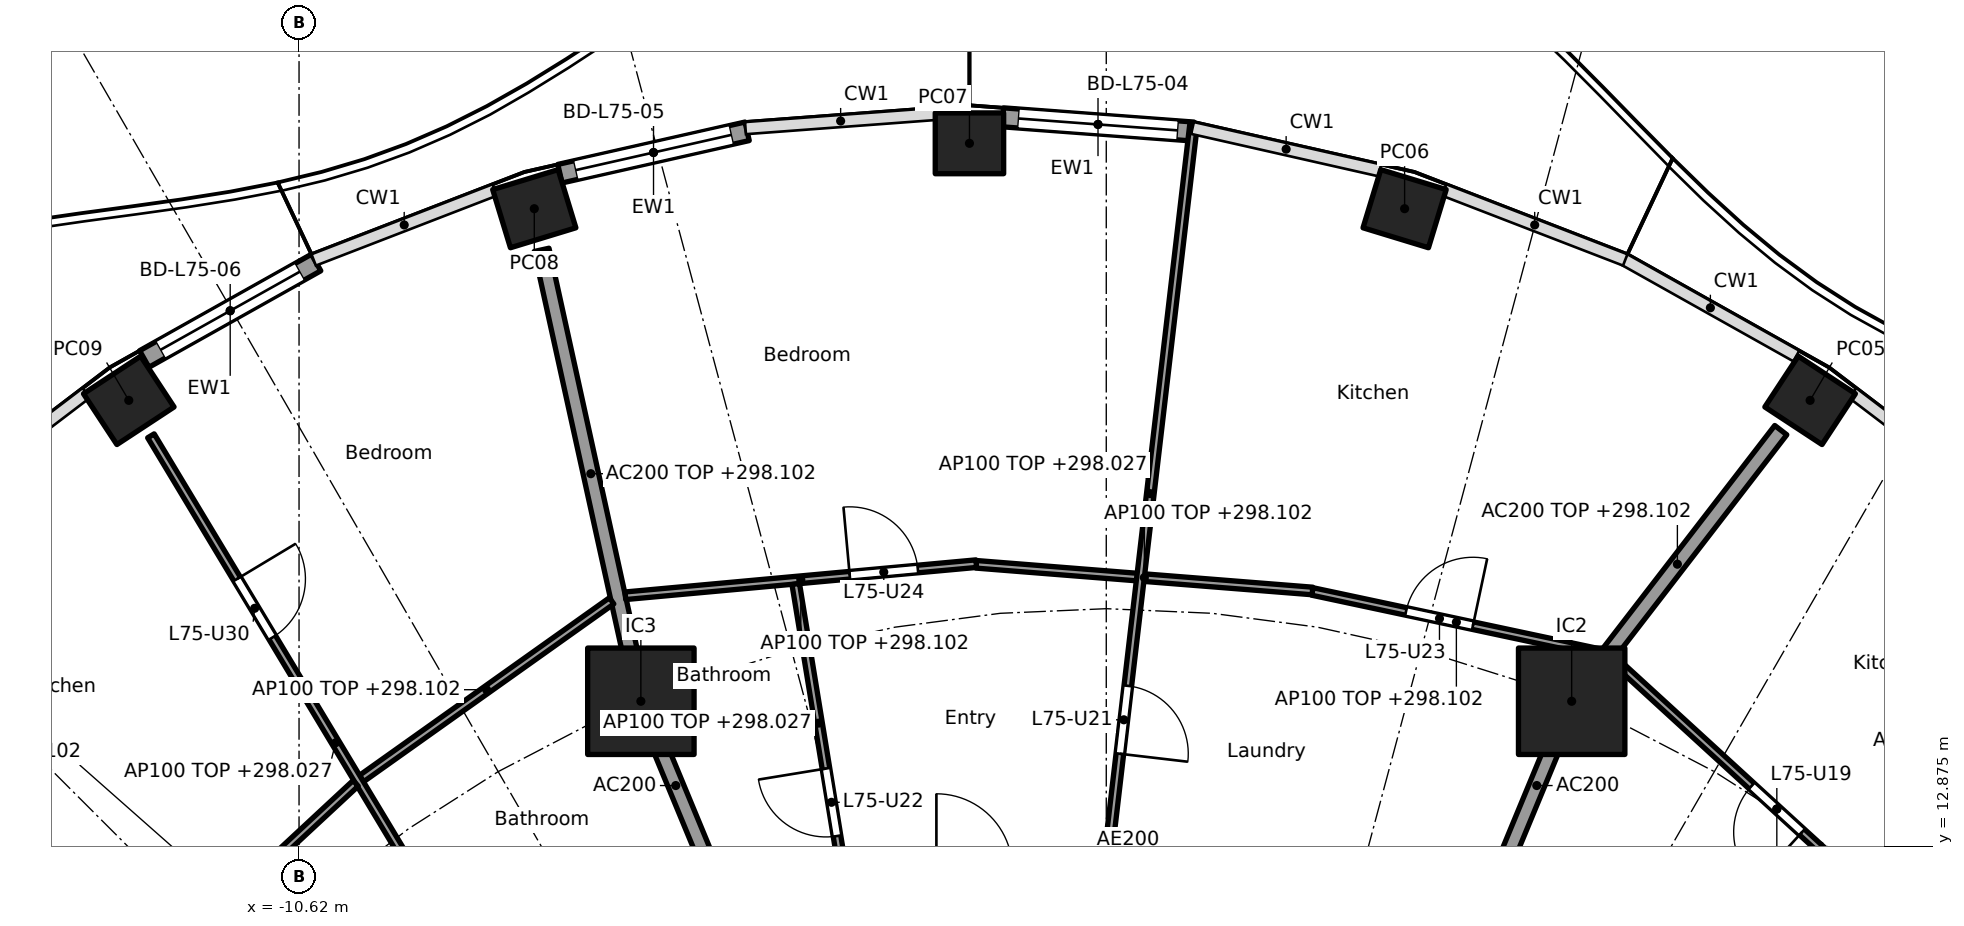
"""IFC4 building model, lengths in metres.
Left out: names, types, materials, properties, quantities, classifications, styles, units other than length and angle.
Written with IfcOpenShell. Run it as: python <this file> out.ifc"""

import sys

from ifc_helpers import new_model, si_unit, direction, frame, frame_2d, origin, origin_2d, place, context, subcontext, project, spatial, rectangle, hollow_rectangle, extrude, element, fill, save


model = new_model("IFC4")
c1 = context("Model", 3, precision=1e-05, world=origin(), true_north=direction((0.0, 1.0)))
c2 = subcontext(c1, "Body", "Model", "MODEL_VIEW")
j1 = project(units=[si_unit("LENGTHUNIT", "METRE"), si_unit("PLANEANGLEUNIT", "RADIAN")], contexts=[c1])
p1 = place(None, origin())
s1 = spatial("IfcSite", under=j1, at=p1, CompositionType="ELEMENT")
p2 = place(p1, origin())
s2 = spatial("IfcBuilding", under=s1, at=p2, CompositionType="ELEMENT")
p3 = place(p2, frame((0.0, 0.0, 295.5)))
s3 = spatial("IfcBuildingStorey", under=s2, at=p3, CompositionType="ELEMENT", Elevation=295.5)
for number, where, z_axis, x_axis in (
    (1, (9.26, 18.741, 0.0), (0.0, 0.0, 1.0), (-0.836, 0.549, 0.0)),
    (2, (3.925, 21.262, 0.0), (0.0, 0.0, 1.0), (-0.957, 0.292, 0.0)),
    (3, (-1.8, 22.122, 0.0), (0.0, 0.0, 1.0), (-1.0, 0.0, 0.0)),
    (4, (-7.525, 21.262, 0.0), (0.0, 0.0, 1.0), (-0.957, -0.292, 0.0)),
    (5, (-12.86, 18.741, 0.0), (0.0, 0.0, 1.0), (-0.836, -0.549, 0.0)),
):
    element("IfcColumn", number, at=place(p3, frame(where, z_axis=z_axis, x_axis=x_axis)), inside=s3, PredefinedType="COLUMN", context=c2, shape_type="SweptSolid", body=[
        extrude(hollow_rectangle(XDim=0.9, YDim=0.8, WallThickness=0.028, at=origin_2d()), origin(), (0.0, 0.0, 1.0), 3.7),
    ])
for number, where, z_axis, x_axis in (
    (6, (6.123, 14.782, 0.0), (0.0, 0.0, 1.0), (1.0, 0.0, 0.0)),
    (7, (-6.123, 14.782, 0.0), (0.0, 0.0, 1.0), (1.0, 0.0, 0.0)),
):
    element("IfcColumn", number, at=place(p3, frame(where, z_axis=z_axis, x_axis=x_axis)), inside=s3, PredefinedType="COLUMN", context=c2, shape_type="SweptSolid", body=[
        extrude(rectangle(XDim=1.4, YDim=1.4, at=origin_2d()), origin(), (0.0, 0.0, 1.0), 3.7),
    ])
p4 = place(p3, frame((-1.361, 22.464, 0.0), z_axis=(0.0, 0.0, 1.0), x_axis=(0.997229684519, -0.074383844448, 0.0)))
e8 = element("IfcWall", 8, at=p4, inside=s3, PredefinedType="SOLIDWALL", context=c2, shape_type="SweptSolid", body=[
    extrude(rectangle(XDim=2.511, YDim=0.25, at=frame_2d((1.255, 0.0))), origin(), (0.0, 0.0, 1.0), 3.28),
])
p5 = place(p4, frame((0.205, 0.0, 0.0)))
e9 = element("IfcOpeningElement", 9, at=p5, cuts=e8, PredefinedType="OPENING", context=c2, shape_type="SweptSolid", body=[
    extrude(rectangle(XDim=2.1, YDim=2.4, at=frame_2d((1.05, 1.2))), frame((0.0, 0.135, 0.0), z_axis=(0.0, -1.0, 0.0), x_axis=(1.0, 0.0, 0.0)), (0.0, 0.0, 1.0), 0.27),
])
p6 = place(p3, frame((-7.188, 21.723, 0.0), z_axis=(0.0, 0.0, 1.0), x_axis=(0.975319584032, 0.220797891756, 0.0)))
e10 = element("IfcWall", 10, at=p6, inside=s3, PredefinedType="SOLIDWALL", context=c2, shape_type="SweptSolid", body=[
    extrude(rectangle(XDim=2.525, YDim=0.25, at=frame_2d((1.263, 0.0))), origin(), (0.0, 0.0, 1.0), 3.28),
])
p7 = place(p6, frame((0.213, 0.0, 0.0)))
e11 = element("IfcOpeningElement", 11, at=p7, cuts=e10, PredefinedType="OPENING", context=c2, shape_type="SweptSolid", body=[
    extrude(rectangle(XDim=2.1, YDim=2.4, at=frame_2d((1.05, 1.2))), frame((0.0, 0.135, 0.0), z_axis=(0.0, -1.0, 0.0), x_axis=(1.0, 0.0, 0.0)), (0.0, 0.0, 1.0), 0.27),
])
p8 = place(p3, frame((-12.656, 19.285, 0.0), z_axis=(0.0, 0.0, 1.0), x_axis=(0.872075426507, 0.489371485154, 0.0)))
e12 = element("IfcWall", 12, at=p8, inside=s3, PredefinedType="SOLIDWALL", context=c2, shape_type="SweptSolid", body=[
    extrude(rectangle(XDim=2.593, YDim=0.25, at=frame_2d((1.297, 0.0))), origin(), (0.0, 0.0, 1.0), 3.28),
])
p9 = place(p8, frame((0.247, 0.0, 0.0)))
e13 = element("IfcOpeningElement", 13, at=p9, cuts=e12, PredefinedType="OPENING", context=c2, shape_type="SweptSolid", body=[
    extrude(rectangle(XDim=2.1, YDim=2.4, at=frame_2d((1.05, 1.2))), frame((0.0, 0.135, 0.0), z_axis=(0.0, -1.0, 0.0), x_axis=(1.0, 0.0, 0.0)), (0.0, 0.0, 1.0), 0.27),
])
p10 = place(p3, frame((5.243, 12.657, 0.0), z_axis=(0.0, 0.0, 1.0), x_axis=(0.382691608661, 0.923876145736, 0.0)))
e14 = element("IfcWall", 14, at=p10, inside=s3, PredefinedType="PARTITIONING", context=c2, shape_type="SweptSolid", body=[
    extrude(rectangle(XDim=2.2, YDim=0.2, at=frame_2d((1.1, 0.0))), origin(), (0.0, 0.0, 1.0), 3.28),
])
p11 = place(p3, frame((6.154, 14.822, 0.0), z_axis=(0.0, 0.0, 1.0), x_axis=(0.610687612043, 0.791871606068, 0.0)))
e15 = element("IfcWall", 15, at=p11, inside=s3, PredefinedType="PARTITIONING", context=c2, shape_type="SweptSolid", body=[
    extrude(rectangle(XDim=4.455, YDim=0.2, at=frame_2d((2.228, 0.0))), origin(), (0.0, 0.0, 1.0), 2.602),
])
p12 = place(p3, frame((-5.243, 12.657, 0.0), z_axis=(0.0, 0.0, 1.0), x_axis=(-0.38273085373, 0.923859888513, 0.0)))
e16 = element("IfcWall", 16, at=p12, inside=s3, PredefinedType="PARTITIONING", context=c2, shape_type="SweptSolid", body=[
    extrude(rectangle(XDim=2.199, YDim=0.2, at=frame_2d((1.1, 0.0))), origin(), (0.0, 0.0, 1.0), 3.28),
])
p13 = place(p3, frame((-6.134, 14.831, 0.0), z_axis=(0.0, 0.0, 1.0), x_axis=(-0.214842475666, 0.976648714047, 0.0)))
e17 = element("IfcWall", 17, at=p13, inside=s3, PredefinedType="PARTITIONING", context=c2, shape_type="SweptSolid", body=[
    extrude(rectangle(XDim=6.031, YDim=0.2, at=frame_2d((3.015, 0.0))), origin(), (0.0, 0.0, 1.0), 2.602),
])
p14 = place(p3, frame((10.972, 11.398, 0.0), z_axis=(0.0, 0.0, 1.0), x_axis=(-0.737830272434, 0.674986288069, 0.0)))
e18 = element("IfcWall", 18, at=p14, inside=s3, PredefinedType="PARTITIONING", context=c2, shape_type="SweptSolid", body=[
    extrude(rectangle(XDim=5.827, YDim=0.1, at=frame_2d((2.914, 0.0))), origin(), (0.0, 0.0, 1.0), 2.602),
])
p15 = place(p14, frame((2.464, 0.0, 0.0)))
e19 = element("IfcOpeningElement", 19, at=p15, cuts=e18, PredefinedType="OPENING", context=c2, shape_type="SweptSolid", body=[
    extrude(rectangle(XDim=0.9, YDim=2.1, at=frame_2d((0.45, 1.05))), frame((0.0, 0.06, 0.0), z_axis=(0.0, -1.0, 0.0), x_axis=(1.0, 0.0, 0.0)), (0.0, 0.0, 1.0), 0.12),
])
p16 = place(p3, frame((6.5, 15.419, 0.0), z_axis=(0.0, 0.0, 1.0), x_axis=(-0.978053492557, 0.208353943321, 0.0)))
e20 = element("IfcWall", 20, at=p16, inside=s3, PredefinedType="PARTITIONING", context=c2, shape_type="SweptSolid", body=[
    extrude(rectangle(XDim=3.874, YDim=0.1, at=frame_2d((1.937, 0.0))), origin(), (0.0, 0.0, 1.0), 2.602),
])
p17 = place(p16, frame((1.714, 0.0, 0.0)))
e21 = element("IfcOpeningElement", 21, at=p17, cuts=e20, PredefinedType="OPENING", context=c2, shape_type="SweptSolid", body=[
    extrude(rectangle(XDim=0.9, YDim=2.1, at=frame_2d((0.45, 1.05))), frame((0.0, 0.06, 0.0), z_axis=(0.0, -1.0, 0.0), x_axis=(1.0, 0.0, 0.0)), (0.0, 0.0, 1.0), 0.12),
])
p18 = place(p3, frame((2.713, 16.233, 0.0), z_axis=(0.0, 0.0, 1.0), x_axis=(-0.996870142942, 0.079056423588, 0.0)))
e22 = element("IfcWall", 22, at=p18, inside=s3, PredefinedType="PARTITIONING", context=c2, shape_type="SweptSolid", body=[
    extrude(rectangle(XDim=4.438, YDim=0.1, at=frame_2d((2.219, 0.0))), origin(), (0.0, 0.0, 1.0), 2.602),
])
p19 = place(p3, frame((0.012, 12.664, 0.0), z_axis=(0.0, 0.0, 1.0), x_axis=(0.11636251357, 0.993206808996, 0.0)))
e23 = element("IfcWall", 23, at=p19, inside=s3, PredefinedType="PARTITIONING", context=c2, shape_type="SweptSolid", body=[
    extrude(rectangle(XDim=9.765, YDim=0.1, at=frame_2d((4.882, 0.0))), origin(), (0.0, 0.0, 1.0), 2.527),
])
p20 = place(p19, frame((1.437, 0.0, 0.0)))
e24 = element("IfcOpeningElement", 24, at=p20, cuts=e23, PredefinedType="OPENING", context=c2, shape_type="SweptSolid", body=[
    extrude(rectangle(XDim=0.9, YDim=2.1, at=frame_2d((0.45, 1.05))), frame((0.0, 0.06, 0.0), z_axis=(0.0, -1.0, 0.0), x_axis=(1.0, 0.0, 0.0)), (0.0, 0.0, 1.0), 0.12),
])
p21 = place(p3, frame((-1.711, 16.592, 0.0), z_axis=(0.0, 0.0, 1.0), x_axis=(-0.995843837247, -0.091077175065, 0.0)))
e25 = element("IfcWall", 25, at=p21, inside=s3, PredefinedType="PARTITIONING", context=c2, shape_type="SweptSolid", body=[
    extrude(rectangle(XDim=4.635, YDim=0.1, at=frame_2d((2.317, 0.0))), origin(), (0.0, 0.0, 1.0), 2.602),
])
p22 = place(p21, frame((0.771, 0.0, 0.0)))
e26 = element("IfcOpeningElement", 26, at=p22, cuts=e25, PredefinedType="OPENING", context=c2, shape_type="SweptSolid", body=[
    extrude(rectangle(XDim=0.9, YDim=2.1, at=frame_2d((0.45, 1.05))), frame((0.0, 0.06, 0.0), z_axis=(0.0, -1.0, 0.0), x_axis=(1.0, 0.0, 0.0)), (0.0, 0.0, 1.0), 0.12),
])
p23 = place(p3, frame((-3.486, 12.663, 0.0), z_axis=(0.0, 0.0, 1.0), x_axis=(-0.161602751674, 0.986855891532, 0.0)))
e27 = element("IfcWall", 27, at=p23, inside=s3, PredefinedType="PARTITIONING", context=c2, shape_type="SweptSolid", body=[
    extrude(rectangle(XDim=3.71, YDim=0.1, at=frame_2d((1.855, 0.0))), origin(), (0.0, 0.0, 1.0), 2.527),
])
p24 = place(p23, frame((0.35, 0.0, 0.0)))
e28 = element("IfcOpeningElement", 28, at=p24, cuts=e27, PredefinedType="OPENING", context=c2, shape_type="SweptSolid", body=[
    extrude(rectangle(XDim=0.9, YDim=2.1, at=frame_2d((0.45, 1.05))), frame((0.0, 0.06, 0.0), z_axis=(0.0, -1.0, 0.0), x_axis=(1.0, 0.0, 0.0)), (0.0, 0.0, 1.0), 0.12),
])
p25 = place(p3, frame((-6.508, 16.103, 0.0), z_axis=(0.0, 0.0, 1.0), x_axis=(-0.815202203556, -0.579176456114, 0.0)))
e29 = element("IfcWall", 29, at=p25, inside=s3, PredefinedType="PARTITIONING", context=c2, shape_type="SweptSolid", body=[
    extrude(rectangle(XDim=4.036, YDim=0.1, at=frame_2d((2.018, 0.0))), origin(), (0.0, 0.0, 1.0), 2.602),
])
p26 = place(p3, frame((-7.709, 10.197, 0.0), z_axis=(0.0, 0.0, 1.0), x_axis=(-0.515516160663, 0.856879856278, 0.0)))
e30 = element("IfcWall", 30, at=p26, inside=s3, PredefinedType="PARTITIONING", context=c2, shape_type="SweptSolid", body=[
    extrude(rectangle(XDim=9.426, YDim=0.1, at=frame_2d((4.713, 0.0))), origin(), (0.0, 0.0, 1.0), 2.527),
])
p27 = place(p26, frame((1.615, 0.0, 0.0)))
e31 = element("IfcOpeningElement", 31, at=p27, cuts=e30, PredefinedType="OPENING", context=c2, shape_type="SweptSolid", body=[
    extrude(rectangle(XDim=0.9, YDim=2.1, at=frame_2d((0.45, 1.05))), frame((0.0, 0.06, 0.0), z_axis=(0.0, -1.0, 0.0), x_axis=(1.0, 0.0, 0.0)), (0.0, 0.0, 1.0), 0.12),
])
p28 = place(p26, frame((6.328, 0.0, 0.0)))
e32 = element("IfcOpeningElement", 32, at=p28, cuts=e30, PredefinedType="OPENING", context=c2, shape_type="SweptSolid", body=[
    extrude(rectangle(XDim=0.9, YDim=2.1, at=frame_2d((0.45, 1.05))), frame((0.0, 0.06, 0.0), z_axis=(0.0, -1.0, 0.0), x_axis=(1.0, 0.0, 0.0)), (0.0, 0.0, 1.0), 0.12),
])
p29 = place(p3, frame((-9.875, 13.702, 0.0), z_axis=(0.0, 0.0, 1.0), x_axis=(-0.732618266441, -0.680639754699, 0.0)))
e33 = element("IfcWall", 33, at=p29, inside=s3, PredefinedType="PARTITIONING", context=c2, shape_type="SweptSolid", body=[
    extrude(rectangle(XDim=4.467, YDim=0.1, at=frame_2d((2.233, 0.0))), origin(), (0.0, 0.0, 1.0), 2.602),
])
p30 = place(p29, frame((1.783, 0.0, 0.0)))
e34 = element("IfcOpeningElement", 34, at=p30, cuts=e33, PredefinedType="OPENING", context=c2, shape_type="SweptSolid", body=[
    extrude(rectangle(XDim=0.9, YDim=2.1, at=frame_2d((0.45, 1.05))), frame((0.0, 0.06, 0.0), z_axis=(0.0, -1.0, 0.0), x_axis=(1.0, 0.0, 0.0)), (0.0, 0.0, 1.0), 0.12),
])
p31 = place(p3, frame((-10.183, 7.727, 0.0), z_axis=(0.0, 0.0, 1.0), x_axis=(-0.719063433856, 0.694944442449, 0.0)))
e35 = element("IfcWall", 35, at=p31, inside=s3, PredefinedType="PARTITIONING", context=c2, shape_type="SweptSolid", body=[
    extrude(rectangle(XDim=9.535, YDim=0.1, at=frame_2d((4.768, 0.0))), origin(), (0.0, 0.0, 1.0), 2.527),
])
p32 = place(p31, frame((1.637, 0.0, 0.0)))
e36 = element("IfcOpeningElement", 36, at=p32, cuts=e35, PredefinedType="OPENING", context=c2, shape_type="SweptSolid", body=[
    extrude(rectangle(XDim=0.9, YDim=2.1, at=frame_2d((0.45, 1.05))), frame((0.0, 0.06, 0.0), z_axis=(0.0, -1.0, 0.0), x_axis=(1.0, 0.0, 0.0)), (0.0, 0.0, 1.0), 0.12),
])
p33 = place(p31, frame((6.405, 0.0, 0.0)))
e37 = element("IfcOpeningElement", 37, at=p33, cuts=e35, PredefinedType="OPENING", context=c2, shape_type="SweptSolid", body=[
    extrude(rectangle(XDim=0.9, YDim=2.1, at=frame_2d((0.45, 1.05))), frame((0.0, 0.06, 0.0), z_axis=(0.0, -1.0, 0.0), x_axis=(1.0, 0.0, 0.0)), (0.0, 0.0, 1.0), 0.12),
])
p34 = place(p5, origin())
e38 = element("IfcDoor", 38, at=p34, inside=s3, OperationType="SLIDING_TO_LEFT", PredefinedType="DOOR", context=c2, shape_type="SweptSolid", body=[
    extrude(rectangle(XDim=2.1, YDim=2.4, at=frame_2d((1.05, 1.2))), frame((0.0, 0.025, 0.0), z_axis=(0.0, -1.0, 0.0), x_axis=(1.0, 0.0, 0.0)), (0.0, 0.0, 1.0), 0.05),
])
fill(e9, e38)
p35 = place(p7, origin())
e39 = element("IfcDoor", 39, at=p35, inside=s3, OperationType="SLIDING_TO_LEFT", PredefinedType="DOOR", context=c2, shape_type="SweptSolid", body=[
    extrude(rectangle(XDim=2.1, YDim=2.4, at=frame_2d((1.05, 1.2))), frame((0.0, 0.025, 0.0), z_axis=(0.0, -1.0, 0.0), x_axis=(1.0, 0.0, 0.0)), (0.0, 0.0, 1.0), 0.05),
])
fill(e11, e39)
p36 = place(p9, origin())
e40 = element("IfcDoor", 40, at=p36, inside=s3, OperationType="SLIDING_TO_LEFT", PredefinedType="DOOR", context=c2, shape_type="SweptSolid", body=[
    extrude(rectangle(XDim=2.1, YDim=2.4, at=frame_2d((1.05, 1.2))), frame((0.0, 0.025, 0.0), z_axis=(0.0, -1.0, 0.0), x_axis=(1.0, 0.0, 0.0)), (0.0, 0.0, 1.0), 0.05),
])
fill(e13, e40)
p37 = place(p15, origin())
e41 = element("IfcDoor", 41, at=p37, inside=s3, OperationType="SINGLE_SWING_LEFT", PredefinedType="DOOR", context=c2, shape_type="SweptSolid", body=[
    extrude(rectangle(XDim=0.9, YDim=2.1, at=frame_2d((0.45, 1.05))), frame((0.0, 0.025, 0.0), z_axis=(0.0, -1.0, 0.0), x_axis=(1.0, 0.0, 0.0)), (0.0, 0.0, 1.0), 0.05),
])
fill(e19, e41)
p38 = place(p20, frame((0.9, 0.0, 0.0), x_axis=(-1.0, 0.0, 0.0)))
e42 = element("IfcDoor", 42, at=p38, inside=s3, OperationType="SINGLE_SWING_RIGHT", PredefinedType="DOOR", context=c2, shape_type="SweptSolid", body=[
    extrude(rectangle(XDim=0.9, YDim=2.1, at=frame_2d((0.45, 1.05))), frame((0.0, 0.025, 0.0), z_axis=(0.0, -1.0, 0.0), x_axis=(1.0, 0.0, 0.0)), (0.0, 0.0, 1.0), 0.05),
])
fill(e24, e42)
p39 = place(p24, origin())
e43 = element("IfcDoor", 43, at=p39, inside=s3, OperationType="SINGLE_SWING_RIGHT", PredefinedType="DOOR", context=c2, shape_type="SweptSolid", body=[
    extrude(rectangle(XDim=0.9, YDim=2.1, at=frame_2d((0.45, 1.05))), frame((0.0, 0.025, 0.0), z_axis=(0.0, -1.0, 0.0), x_axis=(1.0, 0.0, 0.0)), (0.0, 0.0, 1.0), 0.05),
])
fill(e28, e43)
p40 = place(p17, frame((0.9, 0.0, 0.0), x_axis=(-1.0, 0.0, 0.0)))
e44 = element("IfcDoor", 44, at=p40, inside=s3, OperationType="SINGLE_SWING_RIGHT", PredefinedType="DOOR", context=c2, shape_type="SweptSolid", body=[
    extrude(rectangle(XDim=0.9, YDim=2.1, at=frame_2d((0.45, 1.05))), frame((0.0, 0.025, 0.0), z_axis=(0.0, -1.0, 0.0), x_axis=(1.0, 0.0, 0.0)), (0.0, 0.0, 1.0), 0.05),
])
fill(e21, e44)
p41 = place(p22, frame((0.9, 0.0, 0.0), x_axis=(-1.0, 0.0, 0.0)))
e45 = element("IfcDoor", 45, at=p41, inside=s3, OperationType="SINGLE_SWING_LEFT", PredefinedType="DOOR", context=c2, shape_type="SweptSolid", body=[
    extrude(rectangle(XDim=0.9, YDim=2.1, at=frame_2d((0.45, 1.05))), frame((0.0, 0.025, 0.0), z_axis=(0.0, -1.0, 0.0), x_axis=(1.0, 0.0, 0.0)), (0.0, 0.0, 1.0), 0.05),
])
fill(e26, e45)
p42 = place(p28, frame((0.9, 0.0, 0.0), x_axis=(-1.0, 0.0, 0.0)))
e46 = element("IfcDoor", 46, at=p42, inside=s3, OperationType="SINGLE_SWING_LEFT", PredefinedType="DOOR", context=c2, shape_type="SweptSolid", body=[
    extrude(rectangle(XDim=0.9, YDim=2.1, at=frame_2d((0.45, 1.05))), frame((0.0, 0.025, 0.0), z_axis=(0.0, -1.0, 0.0), x_axis=(1.0, 0.0, 0.0)), (0.0, 0.0, 1.0), 0.05),
])
fill(e32, e46)
save(model, sys.argv[1])
